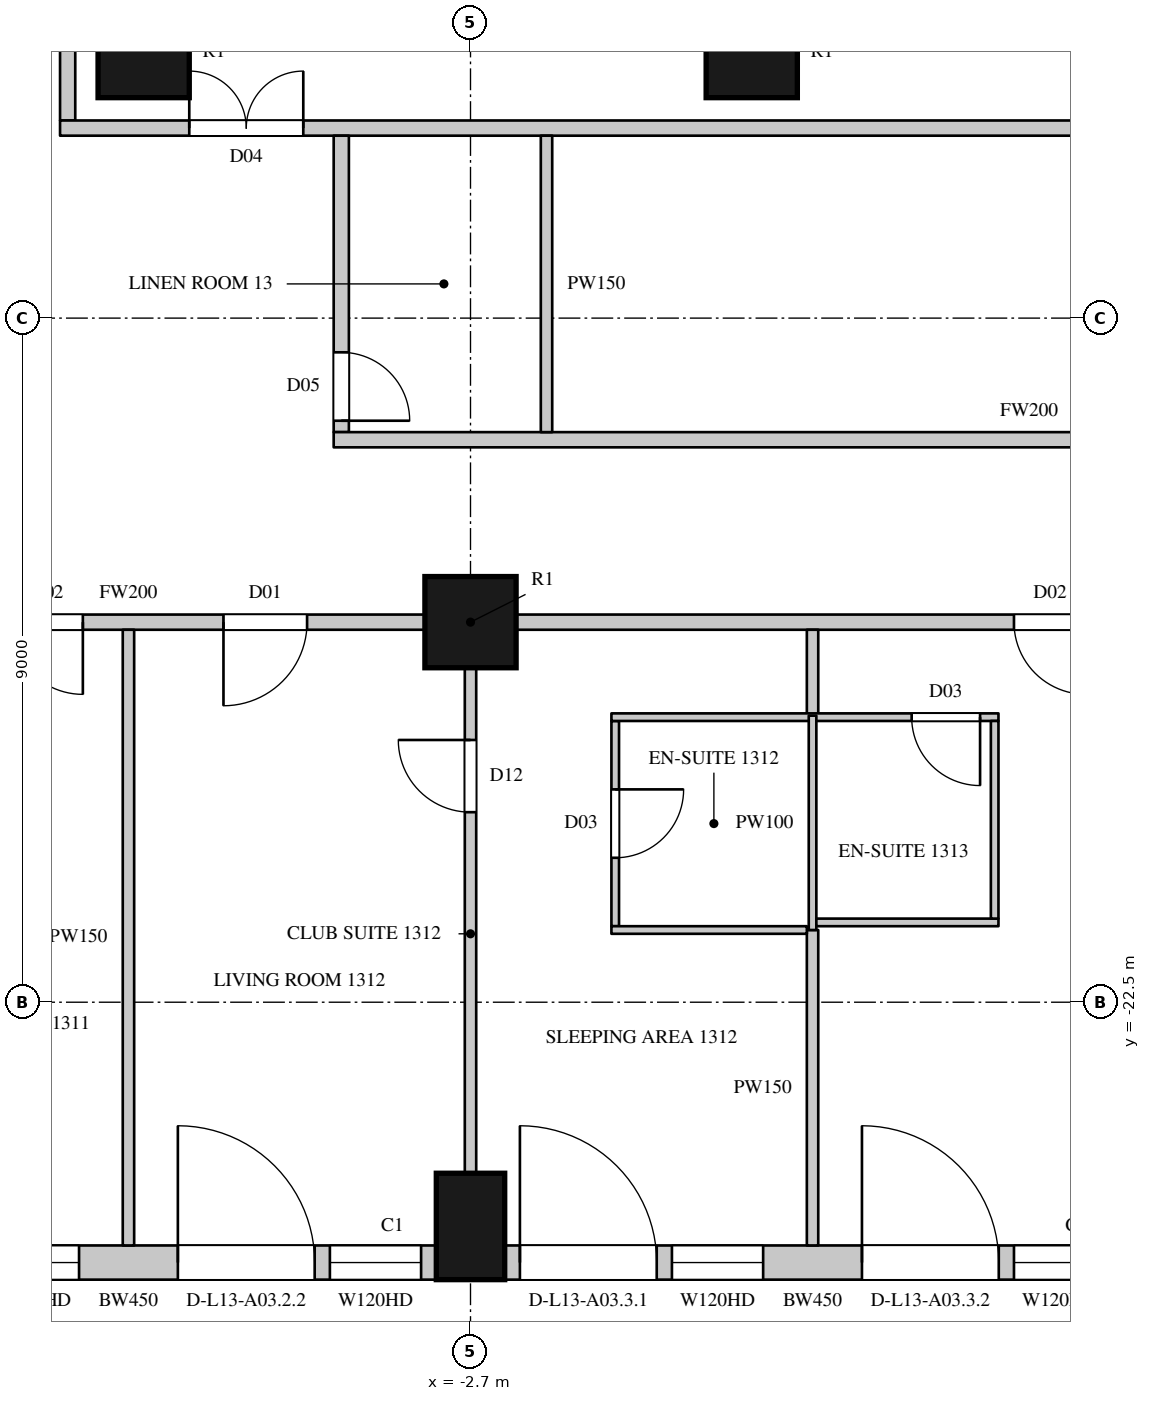
"""IFC4 building model, lengths in metres.
Left out: names, types, materials, properties, quantities, classifications, styles, units other than length and angle.
Written with IfcOpenShell. Run it as: python <this file> out.ifc"""

import sys

from ifc_helpers import new_model, si_unit, direction, frame, frame_2d, origin, origin_2d, place, context, subcontext, project, spatial, rectangle, circle, extrude, element, fill, save


model = new_model("IFC4")
c1 = context("Model", 3, precision=1e-05, world=origin(), true_north=direction((0.0, 1.0)))
c2 = subcontext(c1, "Body", "Model", "MODEL_VIEW")
j1 = project(units=[si_unit("LENGTHUNIT", "METRE"), si_unit("PLANEANGLEUNIT", "RADIAN")], contexts=[c1])
p1 = place(None, origin())
s1 = spatial("IfcSite", under=j1, at=p1, CompositionType="ELEMENT")
p2 = place(p1, origin())
s2 = spatial("IfcBuilding", under=s1, at=p2, CompositionType="ELEMENT")
p3 = place(p2, frame((0.0, 0.0, 77.1)))
s3 = spatial("IfcBuildingStorey", under=s2, at=p3, CompositionType="ELEMENT", Elevation=77.1)
p4 = place(p3, frame((-2.7, -25.45, 0.0), z_axis=(0.0, 0.0, 1.0), x_axis=(1.0, 0.0, 0.0)))
e1 = element("IfcColumn", 1, at=p4, inside=s3, PredefinedType="COLUMN", context=c2, shape_type="SweptSolid", body=[
    extrude(rectangle(XDim=0.9, YDim=1.4, at=origin_2d()), origin(), (0.0, 0.0, 1.0), 3.6),
])
for number, where, z_axis, x_axis in (
    (2, (-2.7, -17.5, 0.0), (0.0, 0.0, 1.0), (1.0, 0.0, 0.0)),
    (3, (-7.0, -10.0, 0.0), (0.0, 0.0, 1.0), (1.0, 0.0, 0.0)),
    (4, (1.0, -10.0, 0.0), (0.0, 0.0, 1.0), (1.0, 0.0, 0.0)),
):
    element("IfcColumn", number, at=place(p3, frame(where, z_axis=z_axis, x_axis=x_axis)), inside=s3, PredefinedType="COLUMN", context=c2, shape_type="SweptSolid", body=[
        extrude(circle(Radius=0.6, at=origin_2d()), origin(), (0.0, 0.0, 1.0), 3.6),
    ])
p5 = place(p3, frame((-11.25, -25.925, 0.0), z_axis=(0.0, 0.0, 1.0), x_axis=(1.0, 0.0, 0.0)))
e5 = element("IfcWall", 5, at=p5, inside=s3, PredefinedType="SOLIDWALL", context=c2, shape_type="SweptSolid", body=[
    extrude(rectangle(XDim=8.1, YDim=0.45, at=frame_2d((4.05, 0.0))), origin(), (0.0, 0.0, 1.0), 3.3),
])
p6 = place(p5, frame((0.2, 0.0, 0.0)))
e6 = element("IfcOpeningElement", 6, at=p6, cuts=e5, PredefinedType="OPENING", context=c2, shape_type="SweptSolid", body=[
    extrude(rectangle(XDim=1.8, YDim=2.4, at=frame_2d((0.9, 1.2))), frame((0.0, 0.235, 0.0), z_axis=(0.0, -1.0, 0.0), x_axis=(1.0, 0.0, 0.0)), (0.0, 0.0, 1.0), 0.47),
])
p7 = place(p5, frame((2.2, 0.0, 1.05)))
e7 = element("IfcOpeningElement", 7, at=p7, cuts=e5, PredefinedType="OPENING", context=c2, shape_type="SweptSolid", body=[
    extrude(rectangle(XDim=1.2, YDim=2.0, at=frame_2d((0.6, 1.0))), frame((0.0, 0.235, 0.0), z_axis=(0.0, -1.0, 0.0), x_axis=(1.0, 0.0, 0.0)), (0.0, 0.0, 1.0), 0.47),
])
p8 = place(p5, frame((4.7, 0.0, 0.0)))
e8 = element("IfcOpeningElement", 8, at=p8, cuts=e5, PredefinedType="OPENING", context=c2, shape_type="SweptSolid", body=[
    extrude(rectangle(XDim=1.8, YDim=2.4, at=frame_2d((0.9, 1.2))), frame((0.0, 0.235, 0.0), z_axis=(0.0, -1.0, 0.0), x_axis=(1.0, 0.0, 0.0)), (0.0, 0.0, 1.0), 0.47),
])
p9 = place(p5, frame((6.7, 0.0, 1.05)))
e9 = element("IfcOpeningElement", 9, at=p9, cuts=e5, PredefinedType="OPENING", context=c2, shape_type="SweptSolid", body=[
    extrude(rectangle(XDim=1.2, YDim=2.0, at=frame_2d((0.6, 1.0))), frame((0.0, 0.235, 0.0), z_axis=(0.0, -1.0, 0.0), x_axis=(1.0, 0.0, 0.0)), (0.0, 0.0, 1.0), 0.47),
])
p10 = place(p3, frame((-2.25, -25.925, 0.0), z_axis=(0.0, 0.0, 1.0), x_axis=(1.0, 0.0, 0.0)))
e10 = element("IfcWall", 10, at=p10, inside=s3, PredefinedType="SOLIDWALL", context=c2, shape_type="SweptSolid", body=[
    extrude(rectangle(XDim=8.1, YDim=0.45, at=frame_2d((4.05, 0.0))), origin(), (0.0, 0.0, 1.0), 3.3),
])
p11 = place(p10, frame((0.2, 0.0, 0.0)))
e11 = element("IfcOpeningElement", 11, at=p11, cuts=e10, PredefinedType="OPENING", context=c2, shape_type="SweptSolid", body=[
    extrude(rectangle(XDim=1.8, YDim=2.4, at=frame_2d((0.9, 1.2))), frame((0.0, 0.235, 0.0), z_axis=(0.0, -1.0, 0.0), x_axis=(1.0, 0.0, 0.0)), (0.0, 0.0, 1.0), 0.47),
])
p12 = place(p10, frame((2.2, 0.0, 1.05)))
e12 = element("IfcOpeningElement", 12, at=p12, cuts=e10, PredefinedType="OPENING", context=c2, shape_type="SweptSolid", body=[
    extrude(rectangle(XDim=1.2, YDim=2.0, at=frame_2d((0.6, 1.0))), frame((0.0, 0.235, 0.0), z_axis=(0.0, -1.0, 0.0), x_axis=(1.0, 0.0, 0.0)), (0.0, 0.0, 1.0), 0.47),
])
p13 = place(p10, frame((4.7, 0.0, 0.0)))
e13 = element("IfcOpeningElement", 13, at=p13, cuts=e10, PredefinedType="OPENING", context=c2, shape_type="SweptSolid", body=[
    extrude(rectangle(XDim=1.8, YDim=2.4, at=frame_2d((0.9, 1.2))), frame((0.0, 0.235, 0.0), z_axis=(0.0, -1.0, 0.0), x_axis=(1.0, 0.0, 0.0)), (0.0, 0.0, 1.0), 0.47),
])
p14 = place(p10, frame((6.7, 0.0, 1.05)))
e14 = element("IfcOpeningElement", 14, at=p14, cuts=e10, PredefinedType="OPENING", context=c2, shape_type="SweptSolid", body=[
    extrude(rectangle(XDim=1.2, YDim=2.0, at=frame_2d((0.6, 1.0))), frame((0.0, 0.235, 0.0), z_axis=(0.0, -1.0, 0.0), x_axis=(1.0, 0.0, 0.0)), (0.0, 0.0, 1.0), 0.47),
])
p15 = place(p3, frame((-11.1, -17.5, 0.0), z_axis=(0.0, 0.0, 1.0), x_axis=(1.0, 0.0, 0.0)))
e15 = element("IfcWall", 15, at=p15, inside=s3, PredefinedType="PARTITIONING", context=c2, shape_type="SweptSolid", body=[
    extrude(rectangle(XDim=7.8, YDim=0.2, at=frame_2d((3.9, 0.0))), origin(), (0.0, 0.0, 1.0), 2.75),
])
p16 = place(p15, frame((2.35, 0.0, 0.0)))
e16 = element("IfcOpeningElement", 16, at=p16, cuts=e15, PredefinedType="OPENING", context=c2, shape_type="SweptSolid", body=[
    extrude(rectangle(XDim=0.95, YDim=2.2, at=frame_2d((0.475, 1.1))), frame((0.0, 0.11, 0.0), z_axis=(0.0, -1.0, 0.0), x_axis=(1.0, 0.0, 0.0)), (0.0, 0.0, 1.0), 0.22),
])
p17 = place(p15, frame((5.15, 0.0, 0.0)))
e17 = element("IfcOpeningElement", 17, at=p17, cuts=e15, PredefinedType="OPENING", context=c2, shape_type="SweptSolid", body=[
    extrude(rectangle(XDim=1.1, YDim=2.4, at=frame_2d((0.55, 1.2))), frame((0.0, 0.11, 0.0), z_axis=(0.0, -1.0, 0.0), x_axis=(1.0, 0.0, 0.0)), (0.0, 0.0, 1.0), 0.22),
])
p18 = place(p3, frame((-2.1, -17.5, 0.0), z_axis=(0.0, 0.0, 1.0), x_axis=(1.0, 0.0, 0.0)))
e18 = element("IfcWall", 18, at=p18, inside=s3, PredefinedType="PARTITIONING", context=c2, shape_type="SweptSolid", body=[
    extrude(rectangle(XDim=7.8, YDim=0.2, at=frame_2d((3.9, 0.0))), origin(), (0.0, 0.0, 1.0), 2.75),
])
p19 = place(p18, frame((6.55, 0.0, 0.0)))
e19 = element("IfcOpeningElement", 19, at=p19, cuts=e18, PredefinedType="OPENING", context=c2, shape_type="SweptSolid", body=[
    extrude(rectangle(XDim=0.95, YDim=2.2, at=frame_2d((0.475, 1.1))), frame((0.0, 0.11, 0.0), z_axis=(0.0, -1.0, 0.0), x_axis=(1.0, 0.0, 0.0)), (0.0, 0.0, 1.0), 0.22),
])
p20 = place(p3, frame((-8.0, -10.9, 0.0), z_axis=(0.0, 0.0, 1.0), x_axis=(0.0, 1.0, 0.0)))
e20 = element("IfcWall", 20, at=p20, inside=s3, PredefinedType="PARTITIONING", context=c2, shape_type="SweptSolid", body=[
    extrude(rectangle(XDim=25.9, YDim=0.2, at=frame_2d((12.95, 0.0))), origin(), (0.0, 0.0, 1.0), 3.3),
])
p21 = place(p20, frame((14.65, 0.0, 0.0)))
e21 = element("IfcOpeningElement", 21, at=p21, cuts=e20, PredefinedType="OPENING", context=c2, shape_type="SweptSolid", body=[
    extrude(rectangle(XDim=1.5, YDim=2.2, at=frame_2d((0.75, 1.1))), frame((0.0, 0.11, 0.0), z_axis=(0.0, -1.0, 0.0), x_axis=(1.0, 0.0, 0.0)), (0.0, 0.0, 1.0), 0.22),
])
p22 = place(p20, frame((24.15, 0.0, 0.0)))
e22 = element("IfcOpeningElement", 22, at=p22, cuts=e20, PredefinedType="OPENING", context=c2, shape_type="SweptSolid", body=[
    extrude(rectangle(XDim=1.6, YDim=2.4, at=frame_2d((0.8, 1.2))), frame((0.0, 0.11, 0.0), z_axis=(0.0, -1.0, 0.0), x_axis=(1.0, 0.0, 0.0)), (0.0, 0.0, 1.0), 0.22),
])
p23 = place(p3, frame((-8.1, -11.0, 0.0), z_axis=(0.0, 0.0, 1.0), x_axis=(1.0, 0.0, 0.0)))
e23 = element("IfcWall", 23, at=p23, inside=s3, PredefinedType="PARTITIONING", context=c2, shape_type="SweptSolid", body=[
    extrude(rectangle(XDim=18.1, YDim=0.2, at=frame_2d((9.05, 0.0))), origin(), (0.0, 0.0, 1.0), 3.3),
])
p24 = place(p23, frame((1.7, 0.0, 0.0)))
e24 = element("IfcOpeningElement", 24, at=p24, cuts=e23, PredefinedType="OPENING", context=c2, shape_type="SweptSolid", body=[
    extrude(rectangle(XDim=1.5, YDim=2.2, at=frame_2d((0.75, 1.1))), frame((0.0, 0.11, 0.0), z_axis=(0.0, -1.0, 0.0), x_axis=(1.0, 0.0, 0.0)), (0.0, 0.0, 1.0), 0.22),
])
p25 = place(p3, frame((-4.4, -15.0, 0.0), z_axis=(0.0, 0.0, 1.0), x_axis=(0.0, 1.0, 0.0)))
e25 = element("IfcWall", 25, at=p25, inside=s3, PredefinedType="PARTITIONING", context=c2, shape_type="SweptSolid", body=[
    extrude(rectangle(XDim=3.9, YDim=0.2, at=frame_2d((1.95, 0.0))), origin(), (0.0, 0.0, 1.0), 3.3),
])
p26 = place(p25, frame((0.15, 0.0, 0.0)))
e26 = element("IfcOpeningElement", 26, at=p26, cuts=e25, PredefinedType="OPENING", context=c2, shape_type="SweptSolid", body=[
    extrude(rectangle(XDim=0.9, YDim=2.2, at=frame_2d((0.45, 1.1))), frame((0.0, 0.11, 0.0), z_axis=(0.0, -1.0, 0.0), x_axis=(1.0, 0.0, 0.0)), (0.0, 0.0, 1.0), 0.22),
])
p27 = place(p3, frame((-4.5, -15.1, 0.0), z_axis=(0.0, 0.0, 1.0), x_axis=(1.0, 0.0, 0.0)))
e27 = element("IfcWall", 27, at=p27, inside=s3, PredefinedType="PARTITIONING", context=c2, shape_type="SweptSolid", body=[
    extrude(rectangle(XDim=18.3, YDim=0.2, at=frame_2d((9.15, 0.0))), origin(), (0.0, 0.0, 1.0), 3.3),
])
p28 = place(p27, frame((10.05, 0.0, 0.0)))
e28 = element("IfcOpeningElement", 28, at=p28, cuts=e27, PredefinedType="OPENING", context=c2, shape_type="SweptSolid", body=[
    extrude(rectangle(XDim=0.9, YDim=2.2, at=frame_2d((0.45, 1.1))), frame((0.0, 0.11, 0.0), z_axis=(0.0, -1.0, 0.0), x_axis=(1.0, 0.0, 0.0)), (0.0, 0.0, 1.0), 0.22),
])
p29 = place(p3, frame((-7.2, -25.7, 0.0), z_axis=(0.0, 0.0, 1.0), x_axis=(0.0, 1.0, 0.0)))
e29 = element("IfcWall", 29, at=p29, inside=s3, PredefinedType="PARTITIONING", context=c2, shape_type="SweptSolid", body=[
    extrude(rectangle(XDim=8.1, YDim=0.15, at=frame_2d((4.05, 0.0))), origin(), (0.0, 0.0, 1.0), 2.65),
])
p30 = place(p3, frame((-2.7, -24.75, 0.0), z_axis=(0.0, 0.0, 1.0), x_axis=(0.0, 1.0, 0.0)))
e30 = element("IfcWall", 30, at=p30, inside=s3, PredefinedType="PARTITIONING", context=c2, shape_type="SweptSolid", body=[
    extrude(rectangle(XDim=6.65, YDim=0.15, at=frame_2d((3.325, 0.0))), origin(), (0.0, 0.0, 1.0), 2.75),
])
p31 = place(p30, frame((4.75, 0.0, 0.0)))
e31 = element("IfcOpeningElement", 31, at=p31, cuts=e30, PredefinedType="OPENING", context=c2, shape_type="SweptSolid", body=[
    extrude(rectangle(XDim=0.95, YDim=2.2, at=frame_2d((0.475, 1.1))), frame((0.0, 0.085, 0.0), z_axis=(0.0, -1.0, 0.0), x_axis=(1.0, 0.0, 0.0)), (0.0, 0.0, 1.0), 0.17),
])
p32 = place(p3, frame((-1.7, -15.0, 0.0), z_axis=(0.0, 0.0, 1.0), x_axis=(0.0, 1.0, 0.0)))
e32 = element("IfcWall", 32, at=p32, inside=s3, PredefinedType="PARTITIONING", context=c2, shape_type="SweptSolid", body=[
    extrude(rectangle(XDim=3.9, YDim=0.15, at=frame_2d((1.95, 0.0))), origin(), (0.0, 0.0, 1.0), 3.3),
])
p33 = place(p3, frame((1.8, -25.7, 0.0), z_axis=(0.0, 0.0, 1.0), x_axis=(0.0, 1.0, 0.0)))
e33 = element("IfcWall", 33, at=p33, inside=s3, PredefinedType="PARTITIONING", context=c2, shape_type="SweptSolid", body=[
    extrude(rectangle(XDim=4.15, YDim=0.15, at=frame_2d((2.075, 0.0))), origin(), (0.0, 0.0, 1.0), 2.65),
])
p34 = place(p3, frame((1.8, -18.73, 0.0), z_axis=(0.0, 0.0, 1.0), x_axis=(0.0, 1.0, 0.0)))
e34 = element("IfcWall", 34, at=p34, inside=s3, PredefinedType="PARTITIONING", context=c2, shape_type="SweptSolid", body=[
    extrude(rectangle(XDim=1.13, YDim=0.15, at=frame_2d((0.565, 0.0))), origin(), (0.0, 0.0, 1.0), 2.65),
])
p35 = place(p3, frame((-0.796, -21.5, 0.0), z_axis=(0.0, 0.0, 1.0), x_axis=(0.0, 1.0, 0.0)))
e35 = element("IfcWall", 35, at=p35, inside=s3, PredefinedType="PARTITIONING", context=c2, shape_type="SweptSolid", body=[
    extrude(rectangle(XDim=2.7, YDim=0.1, at=frame_2d((1.35, 0.0))), origin(), (0.0, 0.0, 1.0), 3.3),
])
p36 = place(p35, frame((0.9, 0.0, 0.0)))
e36 = element("IfcOpeningElement", 36, at=p36, cuts=e35, PredefinedType="OPENING", context=c2, shape_type="SweptSolid", body=[
    extrude(rectangle(XDim=0.9, YDim=2.2, at=frame_2d((0.45, 1.1))), frame((0.0, 0.06, 0.0), z_axis=(0.0, -1.0, 0.0), x_axis=(1.0, 0.0, 0.0)), (0.0, 0.0, 1.0), 0.12),
])
p37 = place(p3, frame((-0.846, -21.55, 0.0), z_axis=(0.0, 0.0, 1.0), x_axis=(1.0, 0.0, 0.0)))
e37 = element("IfcWall", 37, at=p37, inside=s3, PredefinedType="PARTITIONING", context=c2, shape_type="SweptSolid", body=[
    extrude(rectangle(XDim=2.571, YDim=0.1, at=frame_2d((1.286, 0.0))), origin(), (0.0, 0.0, 1.0), 3.3),
])
p38 = place(p3, frame((-0.846, -18.75, 0.0), z_axis=(0.0, 0.0, 1.0), x_axis=(1.0, 0.0, 0.0)))
e38 = element("IfcWall", 38, at=p38, inside=s3, PredefinedType="PARTITIONING", context=c2, shape_type="SweptSolid", body=[
    extrude(rectangle(XDim=5.092, YDim=0.1, at=frame_2d((2.546, 0.0))), origin(), (0.0, 0.0, 1.0), 3.3),
])
p39 = place(p38, frame((3.95, 0.0, 0.0)))
e39 = element("IfcOpeningElement", 39, at=p39, cuts=e38, PredefinedType="OPENING", context=c2, shape_type="SweptSolid", body=[
    extrude(rectangle(XDim=0.9, YDim=2.2, at=frame_2d((0.45, 1.1))), frame((0.0, 0.06, 0.0), z_axis=(0.0, -1.0, 0.0), x_axis=(1.0, 0.0, 0.0)), (0.0, 0.0, 1.0), 0.12),
])
p40 = place(p3, frame((1.8, -21.55, 0.0), z_axis=(0.0, 0.0, 1.0), x_axis=(0.0, 1.0, 0.0)))
e40 = element("IfcWall", 40, at=p40, inside=s3, PredefinedType="PARTITIONING", context=c2, shape_type="SweptSolid", body=[
    extrude(rectangle(XDim=2.82, YDim=0.1, at=frame_2d((1.41, 0.0))), origin(), (0.0, 0.0, 1.0), 2.65),
])
p41 = place(p3, frame((1.85, -21.45, 0.0), z_axis=(0.0, 0.0, 1.0), x_axis=(1.0, 0.0, 0.0)))
e41 = element("IfcWall", 41, at=p41, inside=s3, PredefinedType="PARTITIONING", context=c2, shape_type="SweptSolid", body=[
    extrude(rectangle(XDim=2.396, YDim=0.1, at=frame_2d((1.198, 0.0))), origin(), (0.0, 0.0, 1.0), 3.3),
])
p42 = place(p3, frame((4.196, -21.4, 0.0), z_axis=(0.0, 0.0, 1.0), x_axis=(0.0, 1.0, 0.0)))
e42 = element("IfcWall", 42, at=p42, inside=s3, PredefinedType="PARTITIONING", context=c2, shape_type="SweptSolid", body=[
    extrude(rectangle(XDim=2.6, YDim=0.1, at=frame_2d((1.3, 0.0))), origin(), (0.0, 0.0, 1.0), 3.3),
])
p43 = place(p7, origin())
e43 = element("IfcWindow", 43, at=p43, inside=s3, PartitioningType="SINGLE_PANEL", PredefinedType="WINDOW", context=c2, shape_type="SweptSolid", body=[
    extrude(rectangle(XDim=1.2, YDim=2.0, at=frame_2d((0.6, 1.0))), frame((0.0, 0.135, 0.0), z_axis=(0.0, -1.0, 0.0), x_axis=(1.0, 0.0, 0.0)), (0.0, 0.0, 1.0), 0.06),
])
fill(e7, e43)
p44 = place(p8, origin())
e44 = element("IfcDoor", 44, at=p44, inside=s3, OperationType="SLIDING_TO_LEFT", PredefinedType="DOOR", context=c2, shape_type="SweptSolid", body=[
    extrude(rectangle(XDim=1.8, YDim=2.4, at=frame_2d((0.9, 1.2))), frame((0.0, 0.13, 0.0), z_axis=(0.0, -1.0, 0.0), x_axis=(1.0, 0.0, 0.0)), (0.0, 0.0, 1.0), 0.05),
])
fill(e8, e44)
p45 = place(p9, origin())
e45 = element("IfcWindow", 45, at=p45, inside=s3, PartitioningType="SINGLE_PANEL", PredefinedType="WINDOW", context=c2, shape_type="SweptSolid", body=[
    extrude(rectangle(XDim=1.2, YDim=2.0, at=frame_2d((0.6, 1.0))), frame((0.0, 0.135, 0.0), z_axis=(0.0, -1.0, 0.0), x_axis=(1.0, 0.0, 0.0)), (0.0, 0.0, 1.0), 0.06),
])
fill(e9, e45)
p46 = place(p11, origin())
e46 = element("IfcDoor", 46, at=p46, inside=s3, OperationType="SLIDING_TO_LEFT", PredefinedType="DOOR", context=c2, shape_type="SweptSolid", body=[
    extrude(rectangle(XDim=1.8, YDim=2.4, at=frame_2d((0.9, 1.2))), frame((0.0, 0.13, 0.0), z_axis=(0.0, -1.0, 0.0), x_axis=(1.0, 0.0, 0.0)), (0.0, 0.0, 1.0), 0.05),
])
fill(e11, e46)
p47 = place(p12, origin())
e47 = element("IfcWindow", 47, at=p47, inside=s3, PartitioningType="SINGLE_PANEL", PredefinedType="WINDOW", context=c2, shape_type="SweptSolid", body=[
    extrude(rectangle(XDim=1.2, YDim=2.0, at=frame_2d((0.6, 1.0))), frame((0.0, 0.135, 0.0), z_axis=(0.0, -1.0, 0.0), x_axis=(1.0, 0.0, 0.0)), (0.0, 0.0, 1.0), 0.06),
])
fill(e12, e47)
p48 = place(p13, origin())
e48 = element("IfcDoor", 48, at=p48, inside=s3, OperationType="SLIDING_TO_LEFT", PredefinedType="DOOR", context=c2, shape_type="SweptSolid", body=[
    extrude(rectangle(XDim=1.8, YDim=2.4, at=frame_2d((0.9, 1.2))), frame((0.0, 0.13, 0.0), z_axis=(0.0, -1.0, 0.0), x_axis=(1.0, 0.0, 0.0)), (0.0, 0.0, 1.0), 0.05),
])
fill(e13, e48)
p49 = place(p14, origin())
e49 = element("IfcWindow", 49, at=p49, inside=s3, PartitioningType="SINGLE_PANEL", PredefinedType="WINDOW", context=c2, shape_type="SweptSolid", body=[
    extrude(rectangle(XDim=1.2, YDim=2.0, at=frame_2d((0.6, 1.0))), frame((0.0, 0.135, 0.0), z_axis=(0.0, -1.0, 0.0), x_axis=(1.0, 0.0, 0.0)), (0.0, 0.0, 1.0), 0.06),
])
fill(e14, e49)
p50 = place(p24, origin())
e50 = element("IfcDoor", 50, at=p50, inside=s3, OperationType="DOUBLE_DOOR_SINGLE_SWING", PredefinedType="DOOR", context=c2, shape_type="SweptSolid", body=[
    extrude(rectangle(XDim=1.5, YDim=2.2, at=frame_2d((0.75, 1.1))), frame((0.0, 0.025, 0.0), z_axis=(0.0, -1.0, 0.0), x_axis=(1.0, 0.0, 0.0)), (0.0, 0.0, 1.0), 0.05),
])
fill(e24, e50)
p51 = place(p26, origin())
e51 = element("IfcDoor", 51, at=p51, inside=s3, OperationType="SINGLE_SWING_RIGHT", PredefinedType="DOOR", context=c2, shape_type="SweptSolid", body=[
    extrude(rectangle(XDim=0.9, YDim=2.2, at=frame_2d((0.45, 1.1))), frame((0.0, 0.025, 0.0), z_axis=(0.0, -1.0, 0.0), x_axis=(1.0, 0.0, 0.0)), (0.0, 0.0, 1.0), 0.05),
])
fill(e26, e51)
p52 = place(p16, origin())
e52 = element("IfcDoor", 52, at=p52, inside=s3, OperationType="SINGLE_SWING_LEFT", PredefinedType="DOOR", context=c2, shape_type="SweptSolid", body=[
    extrude(rectangle(XDim=0.95, YDim=2.2, at=frame_2d((0.475, 1.1))), frame((0.0, 0.025, 0.0), z_axis=(0.0, -1.0, 0.0), x_axis=(1.0, 0.0, 0.0)), (0.0, 0.0, 1.0), 0.05),
])
fill(e16, e52)
p53 = place(p17, origin())
e53 = element("IfcDoor", 53, at=p53, inside=s3, OperationType="SINGLE_SWING_RIGHT", PredefinedType="DOOR", context=c2, shape_type="SweptSolid", body=[
    extrude(rectangle(XDim=1.1, YDim=2.4, at=frame_2d((0.55, 1.2))), frame((0.0, 0.025, 0.0), z_axis=(0.0, -1.0, 0.0), x_axis=(1.0, 0.0, 0.0)), (0.0, 0.0, 1.0), 0.05),
])
fill(e17, e53)
p54 = place(p31, origin())
e54 = element("IfcDoor", 54, at=p54, inside=s3, OperationType="SINGLE_SWING_RIGHT", PredefinedType="DOOR", context=c2, shape_type="SweptSolid", body=[
    extrude(rectangle(XDim=0.95, YDim=2.2, at=frame_2d((0.475, 1.1))), frame((0.0, 0.025, 0.0), z_axis=(0.0, -1.0, 0.0), x_axis=(1.0, 0.0, 0.0)), (0.0, 0.0, 1.0), 0.05),
])
fill(e31, e54)
p55 = place(p36, origin())
e55 = element("IfcDoor", 55, at=p55, inside=s3, OperationType="SINGLE_SWING_LEFT", PredefinedType="DOOR", context=c2, shape_type="SweptSolid", body=[
    extrude(rectangle(XDim=0.9, YDim=2.2, at=frame_2d((0.45, 1.1))), frame((0.0, 0.025, 0.0), z_axis=(0.0, -1.0, 0.0), x_axis=(1.0, 0.0, 0.0)), (0.0, 0.0, 1.0), 0.05),
])
fill(e36, e55)
p56 = place(p19, origin())
e56 = element("IfcDoor", 56, at=p56, inside=s3, OperationType="SINGLE_SWING_LEFT", PredefinedType="DOOR", context=c2, shape_type="SweptSolid", body=[
    extrude(rectangle(XDim=0.95, YDim=2.2, at=frame_2d((0.475, 1.1))), frame((0.0, 0.025, 0.0), z_axis=(0.0, -1.0, 0.0), x_axis=(1.0, 0.0, 0.0)), (0.0, 0.0, 1.0), 0.05),
])
fill(e19, e56)
p57 = place(p39, origin())
e57 = element("IfcDoor", 57, at=p57, inside=s3, OperationType="SINGLE_SWING_LEFT", PredefinedType="DOOR", context=c2, shape_type="SweptSolid", body=[
    extrude(rectangle(XDim=0.9, YDim=2.2, at=frame_2d((0.45, 1.1))), frame((0.0, 0.025, 0.0), z_axis=(0.0, -1.0, 0.0), x_axis=(1.0, 0.0, 0.0)), (0.0, 0.0, 1.0), 0.05),
])
fill(e39, e57)
save(model, sys.argv[1])
